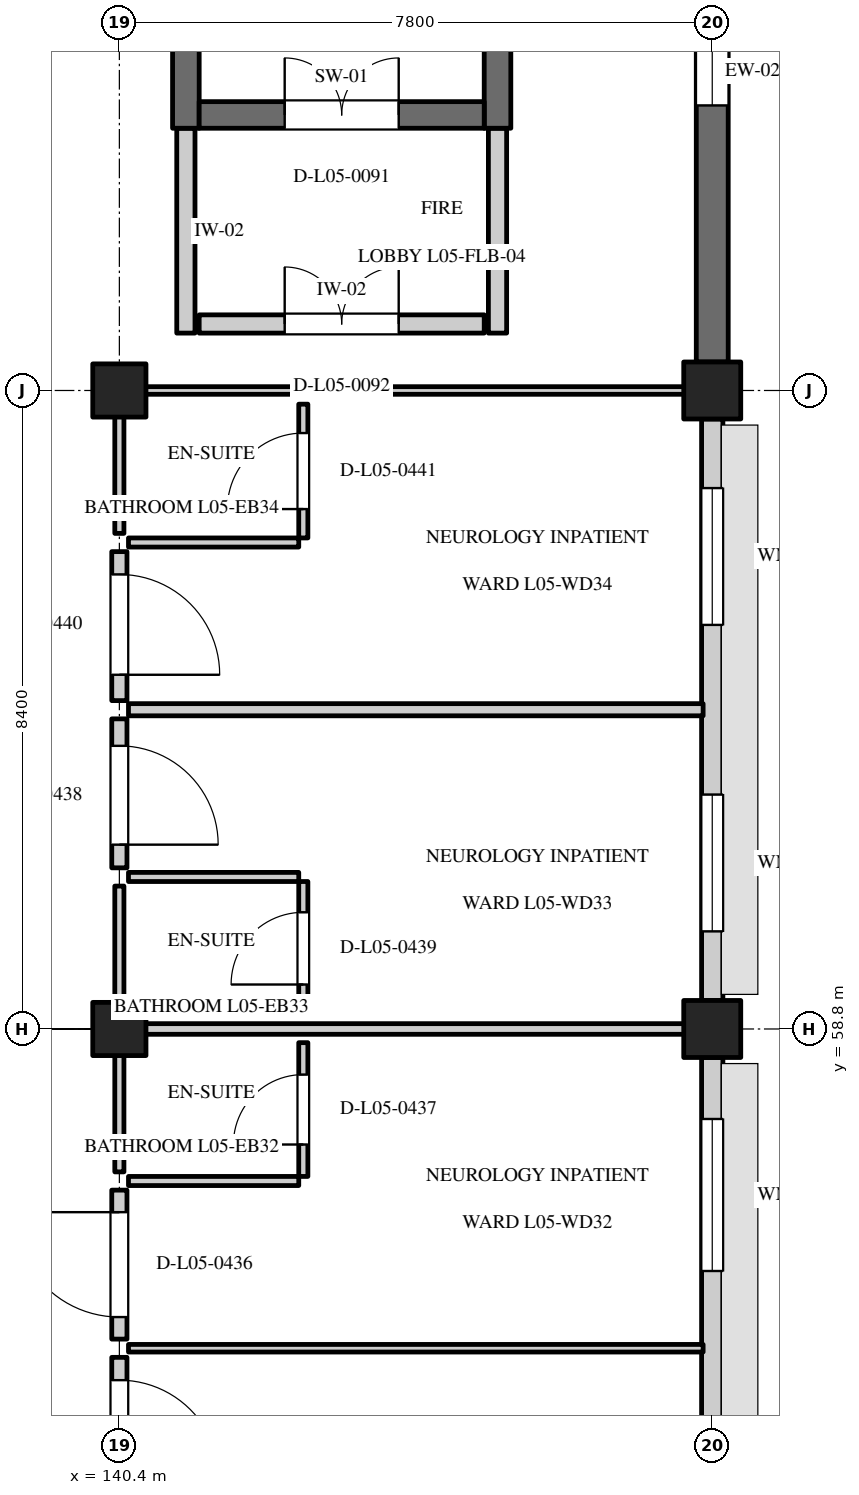
"""IFC4 building model, lengths in metres.
Left out: names, types, materials, properties, quantities, classifications, styles, units other than length and angle.
Written with IfcOpenShell. Run it as: python <this file> out.ifc"""

import sys

from ifc_helpers import new_model, si_unit, direction, frame, frame_2d, origin, origin_2d, place, context, subcontext, project, spatial, rectangle, extrude, element, fill, save


model = new_model("IFC4")
c1 = context("Model", 3, precision=1e-05, world=origin(), true_north=direction((0.0, 1.0)))
c2 = subcontext(c1, "Body", "Model", "MODEL_VIEW")
j1 = project(units=[si_unit("LENGTHUNIT", "METRE"), si_unit("PLANEANGLEUNIT", "RADIAN")], contexts=[c1])
p1 = place(None, origin())
s1 = spatial("IfcSite", under=j1, at=p1, CompositionType="ELEMENT")
p2 = place(p1, origin())
s2 = spatial("IfcBuilding", under=s1, at=p2, CompositionType="ELEMENT")
p3 = place(p2, frame((0.0, 0.0, 22.2)))
s3 = spatial("IfcBuildingStorey", under=s2, at=p3, CompositionType="ELEMENT", Elevation=22.2)
for number, where, z_axis, x_axis in (
    (1, (140.4, 58.8, 0.0), (0.0, 0.0, 1.0), (1.0, 0.0, 0.0)),
    (2, (140.4, 67.2, 0.0), (0.0, 0.0, 1.0), (1.0, 0.0, 0.0)),
):
    element("IfcColumn", number, at=place(p3, frame(where, z_axis=z_axis, x_axis=x_axis)), inside=s3, PredefinedType="COLUMN", context=c2, shape_type="SweptSolid", body=[
        extrude(rectangle(XDim=0.7, YDim=0.7, at=origin_2d()), origin(), (0.0, 0.0, 1.0), 3.9),
    ])
for number, where, z_axis, x_axis in (
    (3, (148.2, 58.8, 0.0), (0.0, 0.0, 1.0), (1.0, 0.0, 0.0)),
    (4, (148.2, 67.2, 0.0), (0.0, 0.0, 1.0), (1.0, 0.0, 0.0)),
):
    element("IfcColumn", number, at=place(p3, frame(where, z_axis=z_axis, x_axis=x_axis)), inside=s3, PredefinedType="COLUMN", context=c2, shape_type="SweptSolid", body=[
        extrude(rectangle(XDim=0.75, YDim=0.75, at=origin_2d()), origin(), (0.0, 0.0, 1.0), 3.9),
    ])
p4 = place(p3, frame((148.2, 50.775, 0.0), z_axis=(0.0, 0.0, 1.0), x_axis=(0.0, 1.0, 0.0)))
e5 = element("IfcWall", 5, at=p4, inside=s3, PredefinedType="STANDARD", context=c2, shape_type="SweptSolid", body=[
    extrude(rectangle(XDim=7.65, YDim=0.28, at=frame_2d((3.825, 0.0))), origin(), (0.0, 0.0, 1.0), 2.95),
])
p5 = place(p4, frame((0.809, 0.0, 0.8)))
e6 = element("IfcOpeningElement", 6, at=p5, cuts=e5, PredefinedType="OPENING", context=c2, shape_type="SweptSolid", body=[
    extrude(rectangle(XDim=2.0, YDim=1.45, at=frame_2d((1.0, 0.725))), frame((0.0, 0.152, 0.0), z_axis=(0.0, -1.0, 0.0), x_axis=(1.0, 0.0, 0.0)), (0.0, 0.0, 1.0), 0.304),
])
p6 = place(p4, frame((4.841, 0.0, 0.8)))
e7 = element("IfcOpeningElement", 7, at=p6, cuts=e5, PredefinedType="OPENING", context=c2, shape_type="SweptSolid", body=[
    extrude(rectangle(XDim=2.0, YDim=1.45, at=frame_2d((1.0, 0.725))), frame((0.0, 0.152, 0.0), z_axis=(0.0, -1.0, 0.0), x_axis=(1.0, 0.0, 0.0)), (0.0, 0.0, 1.0), 0.304),
])
p7 = place(p3, frame((148.2, 59.175, 0.0), z_axis=(0.0, 0.0, 1.0), x_axis=(0.0, 1.0, 0.0)))
e8 = element("IfcWall", 8, at=p7, inside=s3, PredefinedType="STANDARD", context=c2, shape_type="SweptSolid", body=[
    extrude(rectangle(XDim=7.65, YDim=0.28, at=frame_2d((3.825, 0.0))), origin(), (0.0, 0.0, 1.0), 2.95),
])
p8 = place(p7, frame((0.909, 0.0, 0.8)))
e9 = element("IfcOpeningElement", 9, at=p8, cuts=e8, PredefinedType="OPENING", context=c2, shape_type="SweptSolid", body=[
    extrude(rectangle(XDim=1.8, YDim=1.75, at=frame_2d((0.9, 0.875))), frame((0.0, 0.152, 0.0), z_axis=(0.0, -1.0, 0.0), x_axis=(1.0, 0.0, 0.0)), (0.0, 0.0, 1.0), 0.304),
])
p9 = place(p7, frame((4.941, 0.0, 0.8)))
e10 = element("IfcOpeningElement", 10, at=p9, cuts=e8, PredefinedType="OPENING", context=c2, shape_type="SweptSolid", body=[
    extrude(rectangle(XDim=1.8, YDim=1.75, at=frame_2d((0.9, 0.875))), frame((0.0, 0.152, 0.0), z_axis=(0.0, -1.0, 0.0), x_axis=(1.0, 0.0, 0.0)), (0.0, 0.0, 1.0), 0.304),
])
p10 = place(p3, frame((148.2, 67.575, 0.0), z_axis=(0.0, 0.0, 1.0), x_axis=(0.0, 1.0, 0.0)))
e11 = element("IfcWall", 11, at=p10, inside=s3, PredefinedType="SOLIDWALL", context=c2, shape_type="SweptSolid", body=[
    extrude(rectangle(XDim=7.65, YDim=0.42, at=frame_2d((3.825, 0.0))), origin(), (0.0, 0.0, 1.0), 2.95),
])
p11 = place(p10, frame((3.375, 0.0, 0.8)))
e12 = element("IfcOpeningElement", 12, at=p11, cuts=e11, PredefinedType="OPENING", context=c2, shape_type="SweptSolid", body=[
    extrude(rectangle(XDim=0.9, YDim=1.3, at=frame_2d((0.45, 0.65))), frame((0.0, 0.222, 0.0), z_axis=(0.0, -1.0, 0.0), x_axis=(1.0, 0.0, 0.0)), (0.0, 0.0, 1.0), 0.444),
])
for number, where, z_axis, x_axis in (
    (13, (141.275, 70.65, 0.0), (0.0, 0.0, 1.0), (0.0, 1.0, 0.0)),
    (14, (145.375, 70.65, 0.0), (0.0, 0.0, 1.0), (0.0, 1.0, 0.0)),
):
    element("IfcWall", number, at=place(p3, frame(where, z_axis=z_axis, x_axis=x_axis)), inside=s3, PredefinedType="SHEAR", context=c2, shape_type="SweptSolid", body=[
        extrude(rectangle(XDim=10.5, YDim=0.35, at=frame_2d((5.25, 0.0))), origin(), (0.0, 0.0, 1.0), 3.9),
    ])
p12 = place(p3, frame((141.45, 70.825, 0.0), z_axis=(0.0, 0.0, 1.0), x_axis=(1.0, 0.0, 0.0)))
e15 = element("IfcWall", 15, at=p12, inside=s3, PredefinedType="SHEAR", context=c2, shape_type="SweptSolid", body=[
    extrude(rectangle(XDim=3.75, YDim=0.35, at=frame_2d((1.875, 0.0))), origin(), (0.0, 0.0, 1.0), 3.6),
])
p13 = place(p12, frame((1.125, 0.0, 0.0)))
e16 = element("IfcOpeningElement", 16, at=p13, cuts=e15, PredefinedType="OPENING", context=c2, shape_type="SweptSolid", body=[
    extrude(rectangle(XDim=1.5, YDim=2.2, at=frame_2d((0.75, 1.1))), frame((0.0, 0.187, 0.0), z_axis=(0.0, -1.0, 0.0), x_axis=(1.0, 0.0, 0.0)), (0.0, 0.0, 1.0), 0.374),
])
for number, where, z_axis, x_axis in (
    (17, (141.275, 67.955, 0.0), (0.0, 0.0, 1.0), (0.0, 1.0, 0.0)),
    (18, (145.375, 67.955, 0.0), (0.0, 0.0, 1.0), (0.0, 1.0, 0.0)),
):
    element("IfcWall", number, at=place(p3, frame(where, z_axis=z_axis, x_axis=x_axis)), inside=s3, PredefinedType="STANDARD", context=c2, shape_type="SweptSolid", body=[
        extrude(rectangle(XDim=2.695, YDim=0.24, at=frame_2d((1.347, 0.0))), origin(), (0.0, 0.0, 1.0), 3.6),
    ])
p14 = place(p3, frame((141.45, 68.075, 0.0), z_axis=(0.0, 0.0, 1.0), x_axis=(1.0, 0.0, 0.0)))
e19 = element("IfcWall", 19, at=p14, inside=s3, PredefinedType="STANDARD", context=c2, shape_type="SweptSolid", body=[
    extrude(rectangle(XDim=3.75, YDim=0.24, at=frame_2d((1.875, 0.0))), origin(), (0.0, 0.0, 1.0), 3.6),
])
p15 = place(p14, frame((1.125, 0.0, 0.0)))
e20 = element("IfcOpeningElement", 20, at=p15, cuts=e19, PredefinedType="OPENING", context=c2, shape_type="SweptSolid", body=[
    extrude(rectangle(XDim=1.5, YDim=2.2, at=frame_2d((0.75, 1.1))), frame((0.0, 0.132, 0.0), z_axis=(0.0, -1.0, 0.0), x_axis=(1.0, 0.0, 0.0)), (0.0, 0.0, 1.0), 0.264),
])
p16 = place(p3, frame((140.52, 54.6, 0.0), z_axis=(0.0, 0.0, 1.0), x_axis=(1.0, 0.0, 0.0)))
e21 = element("IfcWall", 21, at=p16, inside=s3, PredefinedType="PARTITIONING", context=c2, shape_type="SweptSolid", body=[
    extrude(rectangle(XDim=7.56, YDim=0.1, at=frame_2d((3.78, 0.0))), origin(), (0.0, 0.0, 1.0), 3.58),
])
p17 = place(p3, frame((140.4, 52.52, 0.0), z_axis=(0.0, 0.0, 1.0), x_axis=(0.0, 1.0, 0.0)))
e22 = element("IfcWall", 22, at=p17, inside=s3, PredefinedType="STANDARD", context=c2, shape_type="SweptSolid", body=[
    extrude(rectangle(XDim=1.96, YDim=0.2, at=frame_2d((0.98, 0.0))), origin(), (0.0, 0.0, 1.0), 3.58),
])
p18 = place(p17, frame((0.34, 0.0, 0.0)))
e23 = element("IfcOpeningElement", 23, at=p18, cuts=e22, PredefinedType="OPENING", context=c2, shape_type="SweptSolid", body=[
    extrude(rectangle(XDim=1.32, YDim=2.2, at=frame_2d((0.66, 1.1))), frame((0.0, 0.112, 0.0), z_axis=(0.0, -1.0, 0.0), x_axis=(1.0, 0.0, 0.0)), (0.0, 0.0, 1.0), 0.224),
])
p19 = place(p3, frame((140.52, 58.8, 0.0), z_axis=(0.0, 0.0, 1.0), x_axis=(1.0, 0.0, 0.0)))
e24 = element("IfcWall", 24, at=p19, inside=s3, PredefinedType="PARTITIONING", context=c2, shape_type="SweptSolid", body=[
    extrude(rectangle(XDim=7.56, YDim=0.14, at=frame_2d((3.78, 0.0))), origin(), (0.0, 0.0, 1.0), 2.95),
])
p20 = place(p3, frame((140.4, 54.72, 0.0), z_axis=(0.0, 0.0, 1.0), x_axis=(0.0, 1.0, 0.0)))
e25 = element("IfcWall", 25, at=p20, inside=s3, PredefinedType="STANDARD", context=c2, shape_type="SweptSolid", body=[
    extrude(rectangle(XDim=1.96, YDim=0.2, at=frame_2d((0.98, 0.0))), origin(), (0.0, 0.0, 1.0), 3.58),
])
p21 = place(p20, frame((0.29, 0.0, 0.0)))
e26 = element("IfcOpeningElement", 26, at=p21, cuts=e25, PredefinedType="OPENING", context=c2, shape_type="SweptSolid", body=[
    extrude(rectangle(XDim=1.38, YDim=2.2, at=frame_2d((0.69, 1.1))), frame((0.0, 0.112, 0.0), z_axis=(0.0, -1.0, 0.0), x_axis=(1.0, 0.0, 0.0)), (0.0, 0.0, 1.0), 0.224),
])
p22 = place(p3, frame((140.4, 56.92, 0.0), z_axis=(0.0, 0.0, 1.0), x_axis=(0.0, 1.0, 0.0)))
e27 = element("IfcWall", 27, at=p22, inside=s3, PredefinedType="PARTITIONING", context=c2, shape_type="SweptSolid", body=[
    extrude(rectangle(XDim=1.76, YDim=0.12, at=frame_2d((0.88, 0.0))), origin(), (0.0, 0.0, 1.0), 3.58),
])
p23 = place(p3, frame((140.52, 56.8, 0.0), z_axis=(0.0, 0.0, 1.0), x_axis=(1.0, 0.0, 0.0)))
e28 = element("IfcWall", 28, at=p23, inside=s3, PredefinedType="PARTITIONING", context=c2, shape_type="SweptSolid", body=[
    extrude(rectangle(XDim=2.24, YDim=0.12, at=frame_2d((1.12, 0.0))), origin(), (0.0, 0.0, 1.0), 3.58),
])
p24 = place(p3, frame((142.82, 56.86, 0.0), z_axis=(0.0, 0.0, 1.0), x_axis=(0.0, 1.0, 0.0)))
e29 = element("IfcWall", 29, at=p24, inside=s3, PredefinedType="PARTITIONING", context=c2, shape_type="SweptSolid", body=[
    extrude(rectangle(XDim=1.76, YDim=0.12, at=frame_2d((0.88, 0.0))), origin(), (0.0, 0.0, 1.0), 3.58),
])
p25 = place(p24, frame((0.42, 0.0, 0.0)))
e30 = element("IfcOpeningElement", 30, at=p25, cuts=e29, PredefinedType="OPENING", context=c2, shape_type="SweptSolid", body=[
    extrude(rectangle(XDim=0.92, YDim=2.08, at=frame_2d((0.46, 1.04))), frame((0.0, 0.072, 0.0), z_axis=(0.0, -1.0, 0.0), x_axis=(1.0, 0.0, 0.0)), (0.0, 0.0, 1.0), 0.144),
])
p26 = place(p3, frame((140.52, 63.0, 0.0), z_axis=(0.0, 0.0, 1.0), x_axis=(1.0, 0.0, 0.0)))
e31 = element("IfcWall", 31, at=p26, inside=s3, PredefinedType="PARTITIONING", context=c2, shape_type="SweptSolid", body=[
    extrude(rectangle(XDim=7.56, YDim=0.16, at=frame_2d((3.78, 0.0))), origin(), (0.0, 0.0, 1.0), 3.58),
])
p27 = place(p3, frame((140.4, 60.92, 0.0), z_axis=(0.0, 0.0, 1.0), x_axis=(0.0, 1.0, 0.0)))
e32 = element("IfcWall", 32, at=p27, inside=s3, PredefinedType="STANDARD", context=c2, shape_type="SweptSolid", body=[
    extrude(rectangle(XDim=1.96, YDim=0.2, at=frame_2d((0.98, 0.0))), origin(), (0.0, 0.0, 1.0), 3.58),
])
p28 = place(p27, frame((0.305, 0.0, 0.0)))
e33 = element("IfcOpeningElement", 33, at=p28, cuts=e32, PredefinedType="OPENING", context=c2, shape_type="SweptSolid", body=[
    extrude(rectangle(XDim=1.3, YDim=2.15, at=frame_2d((0.65, 1.075))), frame((0.0, 0.112, 0.0), z_axis=(0.0, -1.0, 0.0), x_axis=(1.0, 0.0, 0.0)), (0.0, 0.0, 1.0), 0.224),
])
p29 = place(p3, frame((140.4, 58.92, 0.0), z_axis=(0.0, 0.0, 1.0), x_axis=(0.0, 1.0, 0.0)))
e34 = element("IfcWall", 34, at=p29, inside=s3, PredefinedType="PARTITIONING", context=c2, shape_type="SweptSolid", body=[
    extrude(rectangle(XDim=1.76, YDim=0.12, at=frame_2d((0.88, 0.0))), origin(), (0.0, 0.0, 1.0), 3.58),
])
p30 = place(p3, frame((140.52, 60.8, 0.0), z_axis=(0.0, 0.0, 1.0), x_axis=(1.0, 0.0, 0.0)))
e35 = element("IfcWall", 35, at=p30, inside=s3, PredefinedType="PARTITIONING", context=c2, shape_type="SweptSolid", body=[
    extrude(rectangle(XDim=2.24, YDim=0.12, at=frame_2d((1.12, 0.0))), origin(), (0.0, 0.0, 1.0), 3.58),
])
p31 = place(p3, frame((142.82, 58.98, 0.0), z_axis=(0.0, 0.0, 1.0), x_axis=(0.0, 1.0, 0.0)))
e36 = element("IfcWall", 36, at=p31, inside=s3, PredefinedType="PARTITIONING", context=c2, shape_type="SweptSolid", body=[
    extrude(rectangle(XDim=1.76, YDim=0.12, at=frame_2d((0.88, 0.0))), origin(), (0.0, 0.0, 1.0), 3.58),
])
p32 = place(p31, frame((0.405, 0.0, 0.0)))
e37 = element("IfcOpeningElement", 37, at=p32, cuts=e36, PredefinedType="OPENING", context=c2, shape_type="SweptSolid", body=[
    extrude(rectangle(XDim=0.95, YDim=2.1, at=frame_2d((0.475, 1.05))), frame((0.0, 0.072, 0.0), z_axis=(0.0, -1.0, 0.0), x_axis=(1.0, 0.0, 0.0)), (0.0, 0.0, 1.0), 0.144),
])
p33 = place(p3, frame((140.52, 67.2, 0.0), z_axis=(0.0, 0.0, 1.0), x_axis=(1.0, 0.0, 0.0)))
e38 = element("IfcWall", 38, at=p33, inside=s3, PredefinedType="PARTITIONING", context=c2, shape_type="SweptSolid", body=[
    extrude(rectangle(XDim=7.56, YDim=0.1, at=frame_2d((3.78, 0.0))), origin(), (0.0, 0.0, 1.0), 3.58),
])
p34 = place(p3, frame((140.4, 63.12, 0.0), z_axis=(0.0, 0.0, 1.0), x_axis=(0.0, 1.0, 0.0)))
e39 = element("IfcWall", 39, at=p34, inside=s3, PredefinedType="STANDARD", context=c2, shape_type="SweptSolid", body=[
    extrude(rectangle(XDim=1.96, YDim=0.2, at=frame_2d((0.98, 0.0))), origin(), (0.0, 0.0, 1.0), 3.58),
])
p35 = place(p34, frame((0.34, 0.0, 0.0)))
e40 = element("IfcOpeningElement", 40, at=p35, cuts=e39, PredefinedType="OPENING", context=c2, shape_type="SweptSolid", body=[
    extrude(rectangle(XDim=1.32, YDim=2.2, at=frame_2d((0.66, 1.1))), frame((0.0, 0.112, 0.0), z_axis=(0.0, -1.0, 0.0), x_axis=(1.0, 0.0, 0.0)), (0.0, 0.0, 1.0), 0.224),
])
p36 = place(p3, frame((140.4, 65.32, 0.0), z_axis=(0.0, 0.0, 1.0), x_axis=(0.0, 1.0, 0.0)))
e41 = element("IfcWall", 41, at=p36, inside=s3, PredefinedType="PARTITIONING", context=c2, shape_type="SweptSolid", body=[
    extrude(rectangle(XDim=1.76, YDim=0.12, at=frame_2d((0.88, 0.0))), origin(), (0.0, 0.0, 1.0), 3.58),
])
p37 = place(p3, frame((140.52, 65.2, 0.0), z_axis=(0.0, 0.0, 1.0), x_axis=(1.0, 0.0, 0.0)))
e42 = element("IfcWall", 42, at=p37, inside=s3, PredefinedType="PARTITIONING", context=c2, shape_type="SweptSolid", body=[
    extrude(rectangle(XDim=2.24, YDim=0.12, at=frame_2d((1.12, 0.0))), origin(), (0.0, 0.0, 1.0), 3.58),
])
p38 = place(p3, frame((142.82, 65.26, 0.0), z_axis=(0.0, 0.0, 1.0), x_axis=(0.0, 1.0, 0.0)))
e43 = element("IfcWall", 43, at=p38, inside=s3, PredefinedType="PARTITIONING", context=c2, shape_type="SweptSolid", body=[
    extrude(rectangle(XDim=1.76, YDim=0.12, at=frame_2d((0.88, 0.0))), origin(), (0.0, 0.0, 1.0), 3.58),
])
p39 = place(p38, frame((0.38, 0.0, 0.0)))
e44 = element("IfcOpeningElement", 44, at=p39, cuts=e43, PredefinedType="OPENING", context=c2, shape_type="SweptSolid", body=[
    extrude(rectangle(XDim=1.0, YDim=2.1, at=frame_2d((0.5, 1.05))), frame((0.0, 0.072, 0.0), z_axis=(0.0, -1.0, 0.0), x_axis=(1.0, 0.0, 0.0)), (0.0, 0.0, 1.0), 0.144),
])
p40 = place(p6, origin())
e45 = element("IfcWindow", 45, at=p40, inside=s3, PartitioningType="DOUBLE_PANEL_VERTICAL", PredefinedType="WINDOW", context=c2, shape_type="SweptSolid", body=[
    extrude(rectangle(XDim=2.0, YDim=1.45, at=frame_2d((1.0, 0.725))), frame((0.0, 0.03, 0.0), z_axis=(0.0, -1.0, 0.0), x_axis=(1.0, 0.0, 0.0)), (0.0, 0.0, 1.0), 0.06),
])
fill(e7, e45)
p41 = place(p8, origin())
e46 = element("IfcWindow", 46, at=p41, inside=s3, PartitioningType="DOUBLE_PANEL_VERTICAL", PredefinedType="WINDOW", context=c2, shape_type="SweptSolid", body=[
    extrude(rectangle(XDim=1.8, YDim=1.75, at=frame_2d((0.9, 0.875))), frame((0.0, 0.03, 0.0), z_axis=(0.0, -1.0, 0.0), x_axis=(1.0, 0.0, 0.0)), (0.0, 0.0, 1.0), 0.06),
])
fill(e9, e46)
p42 = place(p9, origin())
e47 = element("IfcWindow", 47, at=p42, inside=s3, PartitioningType="DOUBLE_PANEL_VERTICAL", PredefinedType="WINDOW", context=c2, shape_type="SweptSolid", body=[
    extrude(rectangle(XDim=1.8, YDim=1.75, at=frame_2d((0.9, 0.875))), frame((0.0, 0.03, 0.0), z_axis=(0.0, -1.0, 0.0), x_axis=(1.0, 0.0, 0.0)), (0.0, 0.0, 1.0), 0.06),
])
fill(e10, e47)
p43 = place(p11, origin())
e48 = element("IfcWindow", 48, at=p43, inside=s3, PartitioningType="SINGLE_PANEL", PredefinedType="WINDOW", context=c2, shape_type="SweptSolid", body=[
    extrude(rectangle(XDim=0.9, YDim=1.3, at=frame_2d((0.45, 0.65))), frame((0.0, 0.03, 0.0), z_axis=(0.0, -1.0, 0.0), x_axis=(1.0, 0.0, 0.0)), (0.0, 0.0, 1.0), 0.06),
])
fill(e12, e48)
p44 = place(p13, origin())
e49 = element("IfcDoor", 49, at=p44, inside=s3, OperationType="DOUBLE_DOOR_SINGLE_SWING", PredefinedType="DOOR", context=c2, shape_type="SweptSolid", body=[
    extrude(rectangle(XDim=1.5, YDim=2.2, at=frame_2d((0.75, 1.1))), frame((0.0, 0.025, 0.0), z_axis=(0.0, -1.0, 0.0), x_axis=(1.0, 0.0, 0.0)), (0.0, 0.0, 1.0), 0.05),
])
fill(e16, e49)
p45 = place(p15, origin())
e50 = element("IfcDoor", 50, at=p45, inside=s3, OperationType="DOUBLE_DOOR_SINGLE_SWING", PredefinedType="DOOR", context=c2, shape_type="SweptSolid", body=[
    extrude(rectangle(XDim=1.5, YDim=2.2, at=frame_2d((0.75, 1.1))), frame((0.0, 0.025, 0.0), z_axis=(0.0, -1.0, 0.0), x_axis=(1.0, 0.0, 0.0)), (0.0, 0.0, 1.0), 0.05),
])
fill(e20, e50)
p46 = place(p18, frame((1.32, 0.0, 0.0), z_axis=(0.0, 0.0, 1.0), x_axis=(-1.0, 0.0, 0.0)))
e51 = element("IfcDoor", 51, at=p46, inside=s3, OperationType="SINGLE_SWING_RIGHT", PredefinedType="DOOR", context=c2, shape_type="SweptSolid", body=[
    extrude(rectangle(XDim=1.32, YDim=2.2, at=frame_2d((0.66, 1.1))), frame((0.0, 0.025, 0.0), z_axis=(0.0, -1.0, 0.0), x_axis=(1.0, 0.0, 0.0)), (0.0, 0.0, 1.0), 0.05),
])
fill(e23, e51)
p47 = place(p21, frame((1.38, 0.0, 0.0), z_axis=(0.0, 0.0, 1.0), x_axis=(-1.0, 0.0, 0.0)))
e52 = element("IfcDoor", 52, at=p47, inside=s3, OperationType="SINGLE_SWING_LEFT", PredefinedType="DOOR", context=c2, shape_type="SweptSolid", body=[
    extrude(rectangle(XDim=1.38, YDim=2.2, at=frame_2d((0.69, 1.1))), frame((0.0, 0.025, 0.0), z_axis=(0.0, -1.0, 0.0), x_axis=(1.0, 0.0, 0.0)), (0.0, 0.0, 1.0), 0.05),
])
fill(e26, e52)
p48 = place(p25, origin())
e53 = element("IfcDoor", 53, at=p48, inside=s3, OperationType="SINGLE_SWING_LEFT", PredefinedType="DOOR", context=c2, shape_type="SweptSolid", body=[
    extrude(rectangle(XDim=0.92, YDim=2.08, at=frame_2d((0.46, 1.04))), frame((0.0, 0.025, 0.0), z_axis=(0.0, -1.0, 0.0), x_axis=(1.0, 0.0, 0.0)), (0.0, 0.0, 1.0), 0.05),
])
fill(e30, e53)
p49 = place(p28, frame((1.3, 0.0, 0.0), z_axis=(0.0, 0.0, 1.0), x_axis=(-1.0, 0.0, 0.0)))
e54 = element("IfcDoor", 54, at=p49, inside=s3, OperationType="SINGLE_SWING_RIGHT", PredefinedType="DOOR", context=c2, shape_type="SweptSolid", body=[
    extrude(rectangle(XDim=1.3, YDim=2.15, at=frame_2d((0.65, 1.075))), frame((0.0, 0.025, 0.0), z_axis=(0.0, -1.0, 0.0), x_axis=(1.0, 0.0, 0.0)), (0.0, 0.0, 1.0), 0.05),
])
fill(e33, e54)
p50 = place(p32, origin())
e55 = element("IfcDoor", 55, at=p50, inside=s3, OperationType="SINGLE_SWING_LEFT", PredefinedType="DOOR", context=c2, shape_type="SweptSolid", body=[
    extrude(rectangle(XDim=0.95, YDim=2.1, at=frame_2d((0.475, 1.05))), frame((0.0, 0.025, 0.0), z_axis=(0.0, -1.0, 0.0), x_axis=(1.0, 0.0, 0.0)), (0.0, 0.0, 1.0), 0.05),
])
fill(e37, e55)
p51 = place(p35, frame((1.32, 0.0, 0.0), z_axis=(0.0, 0.0, 1.0), x_axis=(-1.0, 0.0, 0.0)))
e56 = element("IfcDoor", 56, at=p51, inside=s3, OperationType="SINGLE_SWING_RIGHT", PredefinedType="DOOR", context=c2, shape_type="SweptSolid", body=[
    extrude(rectangle(XDim=1.32, YDim=2.2, at=frame_2d((0.66, 1.1))), frame((0.0, 0.025, 0.0), z_axis=(0.0, -1.0, 0.0), x_axis=(1.0, 0.0, 0.0)), (0.0, 0.0, 1.0), 0.05),
])
fill(e40, e56)
p52 = place(p39, origin())
e57 = element("IfcDoor", 57, at=p52, inside=s3, OperationType="SINGLE_SWING_LEFT", PredefinedType="DOOR", context=c2, shape_type="SweptSolid", body=[
    extrude(rectangle(XDim=1.0, YDim=2.1, at=frame_2d((0.5, 1.05))), frame((0.0, 0.025, 0.0), z_axis=(0.0, -1.0, 0.0), x_axis=(1.0, 0.0, 0.0)), (0.0, 0.0, 1.0), 0.05),
])
fill(e44, e57)
save(model, sys.argv[1])
